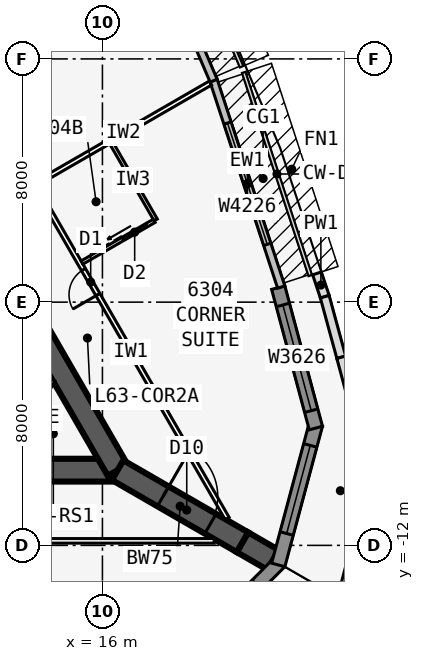
"""IFC4 building model, lengths in metres.
Left out: names, types, materials, properties, quantities, classifications, styles, units other than length and angle.
Written with IfcOpenShell. Run it as: python <this file> out.ifc"""

import sys

from ifc_helpers import new_model, si_unit, direction, frame, frame_2d, origin, place, context, subcontext, project, spatial, polyline, rectangle, outline, extrude, element, fill, save


model = new_model("IFC4")
c1 = context("Model", 3, precision=1e-05, world=origin(), true_north=direction((0.0, 1.0)))
c2 = subcontext(c1, "Body", "Model", "MODEL_VIEW")
j1 = project(units=[si_unit("LENGTHUNIT", "METRE"), si_unit("PLANEANGLEUNIT", "RADIAN")], contexts=[c1])
p1 = place(None, origin())
s1 = spatial("IfcSite", under=j1, at=p1, CompositionType="ELEMENT")
p2 = place(p1, origin())
s2 = spatial("IfcBuilding", under=s1, at=p2, CompositionType="ELEMENT")
p3 = place(p2, frame((0.0, 0.0, 239.3)))
s3 = spatial("IfcBuildingStorey", under=s2, at=p3, CompositionType="ELEMENT", Elevation=239.3)
p4 = place(p3, frame((-16.5, -9.526, 0.0), z_axis=(0.0, 0.0, 1.0), x_axis=(1.0, 0.0, 0.0)))
e1 = element("IfcWall", 1, at=p4, inside=s3, PredefinedType="SHEAR", context=c2, shape_type="SweptSolid", body=[
    extrude(rectangle(XDim=33.0, YDim=0.75, at=frame_2d((16.5, 0.0))), origin(), (0.0, 0.0, 1.0), 3.6),
])
p5 = place(p4, frame((14.05, 0.0, 0.0)))
e2 = element("IfcOpeningElement", 2, at=p5, cuts=e1, PredefinedType="OPENING", context=c2, shape_type="SweptSolid", body=[
    extrude(rectangle(XDim=1.8, YDim=2.13, at=frame_2d((0.9, 1.065))), frame((0.0, 0.385, 0.0), z_axis=(0.0, -1.0, 0.0), x_axis=(1.0, 0.0, 0.0)), (0.0, 0.0, 1.0), 0.77),
])
p6 = place(p3, frame((16.5, -9.526, 0.0), z_axis=(0.0, 0.0, 1.0), x_axis=(-0.499999749417, 0.866025548458, 0.0)))
e3 = element("IfcWall", 3, at=p6, inside=s3, PredefinedType="SHEAR", context=c2, shape_type="SweptSolid", body=[
    extrude(rectangle(XDim=33.0, YDim=0.75, at=frame_2d((16.5, 0.0))), origin(), (0.0, 0.0, 1.0), 3.6),
])
p7 = place(p6, frame((14.15, 0.0, 0.0)))
e4 = element("IfcOpeningElement", 4, at=p7, cuts=e3, PredefinedType="OPENING", context=c2, shape_type="SweptSolid", body=[
    extrude(rectangle(XDim=1.8, YDim=2.13, at=frame_2d((0.9, 1.065))), frame((0.0, 0.385, 0.0), z_axis=(0.0, -1.0, 0.0), x_axis=(1.0, 0.0, 0.0)), (0.0, 0.0, 1.0), 0.77),
])
p8 = place(p6, frame((12.6, 0.0, 0.0)))
e5 = element("IfcOpeningElement", 5, at=p8, cuts=e3, PredefinedType="OPENING", context=c2, shape_type="SweptSolid", body=[
    extrude(rectangle(XDim=1.0, YDim=2.13, at=frame_2d((0.5, 1.065))), frame((0.0, 0.385, 0.0), z_axis=(0.0, -1.0, 0.0), x_axis=(1.0, 0.0, 0.0)), (0.0, 0.0, 1.0), 0.77),
])
p9 = place(p3, frame((16.5, -9.526, 0.0), z_axis=(0.0, 0.0, 1.0), x_axis=(0.866031398331, -0.499989616998, 0.0)))
e6 = element("IfcWall", 6, at=p9, inside=s3, PredefinedType="SHEAR", context=c2, shape_type="SweptSolid", body=[
    extrude(rectangle(XDim=4.746, YDim=0.75, at=frame_2d((2.373, 0.0))), origin(), (0.0, 0.0, 1.0), 3.6),
])
p10 = place(p9, frame((1.725, 0.0, 0.0)))
e7 = element("IfcOpeningElement", 7, at=p10, cuts=e6, PredefinedType="OPENING", context=c2, shape_type="SweptSolid", body=[
    extrude(rectangle(XDim=1.8, YDim=2.13, at=frame_2d((0.9, 1.065))), frame((0.0, 0.385, 0.0), z_axis=(0.0, -1.0, 0.0), x_axis=(1.0, 0.0, 0.0)), (0.0, 0.0, 1.0), 0.77),
])
p11 = place(p3, frame((20.61, -11.899, 0.0), z_axis=(0.0, 0.0, 1.0), x_axis=(0.866009537788, -0.500027479704, 0.0)))
e8 = element("IfcWall", 8, at=p11, inside=s3, PredefinedType="SHEAR", context=c2, shape_type="SweptSolid", body=[
    extrude(rectangle(XDim=1.155, YDim=0.75, at=frame_2d((0.577, 0.0))), origin(), (0.0, 0.0, 1.0), 3.6),
])
p12 = place(p3, frame((18.46, -15.924, 0.0), z_axis=(0.0, 0.0, 1.0), x_axis=(0.707081252484, 0.707132308968, 0.0)))
e9 = element("IfcWall", 9, at=p12, inside=s3, PredefinedType="SOLIDWALL", context=c2, shape_type="SweptSolid", body=[
    extrude(outline(polyline([(4.782, 0.225), (4.723, 0.225), (4.303, 0.113), (4.273, 0.225), (0.0, 0.225), (0.0, -0.225), (4.782, -0.225), (4.782, 0.225)])), origin(), (0.0, 0.0, 1.0), 3.435),
])
p13 = place(p12, frame((0.711, 0.0, 0.45)))
e10 = element("IfcOpeningElement", 10, at=p13, cuts=e9, PredefinedType="OPENING", context=c2, shape_type="SweptSolid", body=[
    extrude(rectangle(XDim=3.0, YDim=2.6, at=frame_2d((1.5, 1.3))), frame((0.0, 0.235, 0.0), z_axis=(0.0, -1.0, 0.0), x_axis=(1.0, 0.0, 0.0)), (0.0, 0.0, 1.0), 0.47),
])
p14 = place(p3, frame((21.783, -12.644, 0.0), z_axis=(0.0, 0.0, 1.0), x_axis=(0.25880328844, 0.965930048136, 0.0)))
e11 = element("IfcWall", 11, at=p14, inside=s3, PredefinedType="SOLIDWALL", context=c2, shape_type="SweptSolid", body=[
    extrude(outline(polyline([(4.782, 0.225), (0.509, 0.225), (0.479, 0.113), (0.06, 0.225), (0.0, 0.225), (0.0, -0.225), (4.782, -0.225), (4.782, 0.225)])), origin(), (0.0, 0.0, 1.0), 3.435),
])
p15 = place(p14, frame((1.07, 0.0, 0.45)))
e12 = element("IfcOpeningElement", 12, at=p15, cuts=e11, PredefinedType="OPENING", context=c2, shape_type="SweptSolid", body=[
    extrude(rectangle(XDim=3.0, YDim=2.6, at=frame_2d((1.5, 1.3))), frame((0.0, 0.235, 0.0), z_axis=(0.0, -1.0, 0.0), x_axis=(1.0, 0.0, 0.0)), (0.0, 0.0, 1.0), 0.47),
])
p16 = place(p3, frame((23.02, -8.141, 0.0), z_axis=(0.0, 0.0, 1.0), x_axis=(-0.25880328844, 0.965930048136, 0.0)))
e13 = element("IfcWall", 13, at=p16, inside=s3, PredefinedType="SOLIDWALL", context=c2, shape_type="SweptSolid", body=[
    extrude(rectangle(XDim=4.782, YDim=0.45, at=frame_2d((2.391, 0.0))), origin(), (0.0, 0.0, 1.0), 3.435),
])
p17 = place(p16, frame((0.591, 0.0, 0.45)))
e14 = element("IfcOpeningElement", 14, at=p17, cuts=e13, PredefinedType="OPENING", context=c2, shape_type="SweptSolid", body=[
    extrude(rectangle(XDim=3.6, YDim=2.6, at=frame_2d((1.8, 1.3))), frame((0.0, 0.235, 0.0), z_axis=(0.0, -1.0, 0.0), x_axis=(1.0, 0.0, 0.0)), (0.0, 0.0, 1.0), 0.47),
])
p18 = place(p3, frame((21.881, -3.503, 0.0), z_axis=(0.0, 0.0, 1.0), x_axis=(-0.311328857048, 0.95030223759, 0.0)))
e15 = element("IfcWall", 15, at=p18, inside=s3, PredefinedType="STANDARD", context=c2, shape_type="SweptSolid", body=[
    extrude(rectangle(XDim=7.153, YDim=0.25, at=frame_2d((3.576, 0.0))), origin(), (0.0, 0.0, 1.0), 3.435),
])
p19 = place(p18, frame((1.476, 0.0, 0.45)))
e16 = element("IfcOpeningElement", 16, at=p19, cuts=e15, PredefinedType="OPENING", context=c2, shape_type="SweptSolid", body=[
    extrude(rectangle(XDim=4.2, YDim=2.6, at=frame_2d((2.1, 1.3))), frame((0.0, 0.135, 0.0), z_axis=(0.0, -1.0, 0.0), x_axis=(1.0, 0.0, 0.0)), (0.0, 0.0, 1.0), 0.27),
])
p20 = place(p3, frame((19.658, 3.284, 0.0), z_axis=(0.0, 0.0, 1.0), x_axis=(-0.393290226175, 0.91941437774, 0.0)))
e17 = element("IfcWall", 17, at=p20, inside=s3, PredefinedType="STANDARD", context=c2, shape_type="SweptSolid", body=[
    extrude(rectangle(XDim=2.014, YDim=0.25, at=frame_2d((1.007, 0.0))), origin(), (0.0, 0.0, 1.0), 3.435),
])
p21 = place(p3, frame((23.058, -3.054, 0.0), z_axis=(0.0, 0.0, 1.0), x_axis=(0.315049484827, -0.949075245758, 0.0)))
e18 = element("IfcWall", 18, at=p21, inside=s3, PredefinedType="PARAPET", context=c2, shape_type="SweptSolid", body=[
    extrude(rectangle(XDim=0.808, YDim=0.3, at=frame_2d((0.404, 0.0))), origin(), (0.0, 0.0, 1.0), 1.1),
])
p22 = place(p3, frame((23.313, -3.821, 0.0), z_axis=(0.0, 0.0, 1.0), x_axis=(0.262857141623, -0.964834764661, 0.0)))
e19 = element("IfcWall", 19, at=p22, inside=s3, PredefinedType="PARAPET", context=c2, shape_type="SweptSolid", body=[
    extrude(rectangle(XDim=2.064, YDim=0.3, at=frame_2d((1.032, 0.0))), origin(), (0.0, 0.0, 1.0), 1.1),
])
p23 = place(p3, frame((23.855, -5.812, 0.0), z_axis=(0.0, 0.0, 1.0), x_axis=(0.258777316825, -0.965937006381, 0.0)))
e20 = element("IfcWall", 20, at=p23, inside=s3, PredefinedType="PARAPET", context=c2, shape_type="SweptSolid", body=[
    extrude(rectangle(XDim=4.144, YDim=0.3, at=frame_2d((2.072, 0.0))), origin(), (0.0, 0.0, 1.0), 1.1),
])
p24 = place(p3, frame((24.927, -9.815, 0.0), z_axis=(0.0, 0.0, 1.0), x_axis=(-0.258795560265, -0.965932118726, 0.0)))
e21 = element("IfcWall", 21, at=p24, inside=s3, PredefinedType="PARAPET", context=c2, shape_type="SweptSolid", body=[
    extrude(rectangle(XDim=4.104, YDim=0.3, at=frame_2d((2.052, 0.0))), origin(), (0.0, 0.0, 1.0), 1.1),
])
p25 = place(p3, frame((-19.677, -11.851, 0.0), z_axis=(0.0, 0.0, 1.0), x_axis=(1.0, 0.0, 0.0)))
e22 = element("IfcWall", 22, at=p25, inside=s3, PredefinedType="PARTITIONING", context=c2, shape_type="SweptSolid", body=[
    extrude(rectangle(XDim=39.354, YDim=0.15, at=frame_2d((19.677, 0.0))), origin(), (0.0, 0.0, 1.0), 3.435),
])
p26 = place(p25, frame((8.502, 0.0, 0.0)))
e23 = element("IfcOpeningElement", 23, at=p26, cuts=e22, PredefinedType="OPENING", context=c2, shape_type="SweptSolid", body=[
    extrude(rectangle(XDim=0.95, YDim=2.13, at=frame_2d((0.475, 1.065))), frame((0.0, 0.085, 0.0), z_axis=(0.0, -1.0, 0.0), x_axis=(1.0, 0.0, 0.0)), (0.0, 0.0, 1.0), 0.17),
])
p27 = place(p25, frame((15.677, 0.0, 0.0)))
e24 = element("IfcOpeningElement", 24, at=p27, cuts=e22, PredefinedType="OPENING", context=c2, shape_type="SweptSolid", body=[
    extrude(rectangle(XDim=1.0, YDim=2.13, at=frame_2d((0.5, 1.065))), frame((0.0, 0.085, 0.0), z_axis=(0.0, -1.0, 0.0), x_axis=(1.0, 0.0, 0.0)), (0.0, 0.0, 1.0), 0.17),
])
p28 = place(p25, frame((22.902, 0.0, 0.0)))
e25 = element("IfcOpeningElement", 25, at=p28, cuts=e22, PredefinedType="OPENING", context=c2, shape_type="SweptSolid", body=[
    extrude(rectangle(XDim=0.95, YDim=2.13, at=frame_2d((0.475, 1.065))), frame((0.0, 0.085, 0.0), z_axis=(0.0, -1.0, 0.0), x_axis=(1.0, 0.0, 0.0)), (0.0, 0.0, 1.0), 0.17),
])
p29 = place(p25, frame((29.902, 0.0, 0.0)))
e26 = element("IfcOpeningElement", 26, at=p29, cuts=e22, PredefinedType="OPENING", context=c2, shape_type="SweptSolid", body=[
    extrude(rectangle(XDim=0.95, YDim=2.13, at=frame_2d((0.475, 1.065))), frame((0.0, 0.085, 0.0), z_axis=(0.0, -1.0, 0.0), x_axis=(1.0, 0.0, 0.0)), (0.0, 0.0, 1.0), 0.17),
])
p30 = place(p3, frame((20.102, -11.115, 0.0), z_axis=(0.0, 0.0, 1.0), x_axis=(-0.500001960654, 0.866024271797, 0.0)))
e27 = element("IfcWall", 27, at=p30, inside=s3, PredefinedType="PARTITIONING", context=c2, shape_type="SweptSolid", body=[
    extrude(rectangle(XDim=12.677, YDim=0.15, at=frame_2d((6.339, 0.0))), origin(), (0.0, 0.0, 1.0), 3.435),
])
p31 = place(p30, frame((8.502, 0.0, 0.0)))
e28 = element("IfcOpeningElement", 28, at=p31, cuts=e27, PredefinedType="OPENING", context=c2, shape_type="SweptSolid", body=[
    extrude(rectangle(XDim=0.95, YDim=2.13, at=frame_2d((0.475, 1.065))), frame((0.0, 0.085, 0.0), z_axis=(0.0, -1.0, 0.0), x_axis=(1.0, 0.0, 0.0)), (0.0, 0.0, 1.0), 0.17),
])
p32 = place(p3, frame((13.829, -0.099, 0.0), z_axis=(0.0, 0.0, 1.0), x_axis=(0.866022562216, 0.500004921708, 0.0)))
e29 = element("IfcWall", 29, at=p32, inside=s3, PredefinedType="PARTITIONING", context=c2, shape_type="SweptSolid", body=[
    extrude(rectangle(XDim=6.609, YDim=0.15, at=frame_2d((3.304, 0.0))), origin(), (0.0, 0.0, 1.0), 2.678),
])
p33 = place(p3, frame((17.753, -1.297, 0.0), z_axis=(0.0, 0.0, 1.0), x_axis=(-0.499990139034, 0.866031096941, 0.0)))
e30 = element("IfcWall", 30, at=p33, inside=s3, PredefinedType="PLUMBINGWALL", context=c2, shape_type="SweptSolid", body=[
    extrude(rectangle(XDim=3.0, YDim=0.12, at=frame_2d((1.5, 0.0))), origin(), (0.0, 0.0, 1.0), 3.435),
])
p34 = place(p3, frame((15.329, -2.697, 0.0), z_axis=(0.0, 0.0, 1.0), x_axis=(0.866035715982, 0.499982138324, 0.0)))
e31 = element("IfcWall", 31, at=p34, inside=s3, PredefinedType="PLUMBINGWALL", context=c2, shape_type="SweptSolid", body=[
    extrude(rectangle(XDim=2.74, YDim=0.12, at=frame_2d((1.37, 0.0))), origin(), (0.0, 0.0, 1.0), 3.435),
])
p35 = place(p34, frame((1.55, 0.0, 0.0)))
e32 = element("IfcOpeningElement", 32, at=p35, cuts=e31, PredefinedType="OPENING", context=c2, shape_type="SweptSolid", body=[
    extrude(rectangle(XDim=0.9, YDim=2.13, at=frame_2d((0.45, 1.065))), frame((0.0, 0.07, 0.0), z_axis=(0.0, -1.0, 0.0), x_axis=(1.0, 0.0, 0.0)), (0.0, 0.0, 1.0), 0.14),
])
p36 = place(p3, frame((14.349, -6.551, 0.0), z_axis=(0.0, 0.0, 1.0), x_axis=(-0.499952404951, -0.866052881055, 0.0)))
e33 = element("IfcWall", 33, at=p36, inside=s3, PredefinedType="SOLIDWALL", context=c2, shape_type="SweptSolid", body=[
    extrude(rectangle(XDim=3.002, YDim=0.2, at=frame_2d((1.501, 0.0))), origin(), (0.0, 0.0, 1.0), 3.435),
])
p37 = place(p15, origin())
e34 = element("IfcWindow", 34, at=p37, inside=s3, PartitioningType="SINGLE_PANEL", PredefinedType="WINDOW", context=c2, shape_type="SweptSolid", body=[
    extrude(rectangle(XDim=3.0, YDim=2.6, at=frame_2d((1.5, 1.3))), frame((0.0, 0.03, 0.0), z_axis=(0.0, -1.0, 0.0), x_axis=(1.0, 0.0, 0.0)), (0.0, 0.0, 1.0), 0.06),
])
fill(e12, e34)
p38 = place(p17, origin())
e35 = element("IfcWindow", 35, at=p38, inside=s3, PartitioningType="SINGLE_PANEL", PredefinedType="WINDOW", context=c2, shape_type="SweptSolid", body=[
    extrude(rectangle(XDim=3.6, YDim=2.6, at=frame_2d((1.8, 1.3))), frame((0.0, 0.03, 0.0), z_axis=(0.0, -1.0, 0.0), x_axis=(1.0, 0.0, 0.0)), (0.0, 0.0, 1.0), 0.06),
])
fill(e14, e35)
p39 = place(p19, origin())
e36 = element("IfcWindow", 36, at=p39, inside=s3, PartitioningType="SINGLE_PANEL", PredefinedType="WINDOW", context=c2, shape_type="SweptSolid", body=[
    extrude(rectangle(XDim=4.2, YDim=2.6, at=frame_2d((2.1, 1.3))), frame((0.0, 0.03, 0.0), z_axis=(0.0, -1.0, 0.0), x_axis=(1.0, 0.0, 0.0)), (0.0, 0.0, 1.0), 0.06),
])
fill(e16, e36)
p40 = place(p35, origin())
e37 = element("IfcDoor", 37, at=p40, inside=s3, OperationType="SLIDING_TO_LEFT", PredefinedType="DOOR", context=c2, shape_type="SweptSolid", body=[
    extrude(rectangle(XDim=0.9, YDim=2.13, at=frame_2d((0.45, 1.065))), frame((0.0, 0.025, 0.0), z_axis=(0.0, -1.0, 0.0), x_axis=(1.0, 0.0, 0.0)), (0.0, 0.0, 1.0), 0.05),
])
fill(e32, e37)
p41 = place(p31, origin())
e38 = element("IfcDoor", 38, at=p41, inside=s3, OperationType="SINGLE_SWING_LEFT", PredefinedType="DOOR", context=c2, shape_type="SweptSolid", body=[
    extrude(rectangle(XDim=0.95, YDim=2.13, at=frame_2d((0.475, 1.065))), frame((0.0, 0.025, 0.0), z_axis=(0.0, -1.0, 0.0), x_axis=(1.0, 0.0, 0.0)), (0.0, 0.0, 1.0), 0.05),
])
fill(e28, e38)
p42 = place(p10, origin())
e39 = element("IfcDoor", 39, at=p42, inside=s3, OperationType="DOUBLE_DOOR_DOUBLE_SWING", PredefinedType="DOOR", context=c2, shape_type="SweptSolid", body=[
    extrude(rectangle(XDim=1.8, YDim=2.13, at=frame_2d((0.9, 1.065))), frame((0.0, 0.025, 0.0), z_axis=(0.0, -1.0, 0.0), x_axis=(1.0, 0.0, 0.0)), (0.0, 0.0, 1.0), 0.05),
])
fill(e7, e39)
save(model, sys.argv[1])
